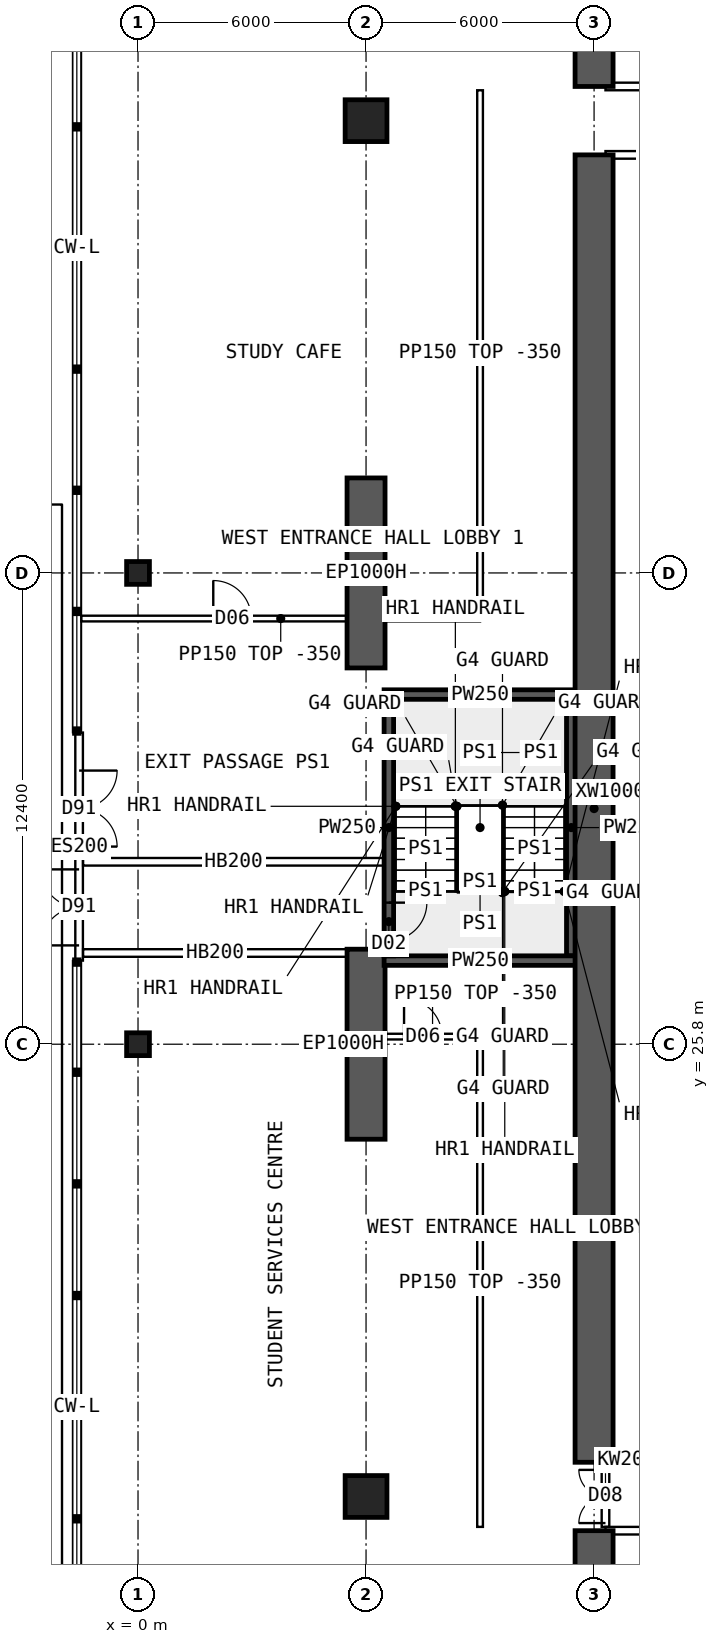
"""IFC4 building model, lengths in metres.
Left out: names, types, materials, properties, quantities, classifications, styles, units other than length and angle.
Written with IfcOpenShell. Run it as: python <this file> out.ifc"""

import sys

from ifc_helpers import new_model, si_unit, direction, frame, frame_2d, origin, origin_2d, place, context, subcontext, project, spatial, polyline, rectangle, hollow_rectangle, outline, extrude, element, fill, save


model = new_model("IFC4")
c1 = context("Model", 3, precision=1e-05, world=origin(), true_north=direction((0.0, 1.0)))
c2 = subcontext(c1, "Body", "Model", "MODEL_VIEW")
j1 = project(units=[si_unit("LENGTHUNIT", "METRE"), si_unit("PLANEANGLEUNIT", "RADIAN")], contexts=[c1])
p1 = place(None, origin())
s1 = spatial("IfcSite", under=j1, at=p1, CompositionType="ELEMENT")
p2 = place(p1, origin())
s2 = spatial("IfcBuilding", under=s1, at=p2, CompositionType="ELEMENT")
p3 = place(p2, origin())
s3 = spatial("IfcBuildingStorey", under=s2, at=p3, CompositionType="ELEMENT", Elevation=0.0)
for number, where, z_axis, x_axis in (
    (1, (6.0, 23.3, 0.0), (0.0, 0.0, 1.0), (0.0, 1.0, 0.0)),
    (2, (6.0, 35.7, 0.0), (0.0, 0.0, 1.0), (0.0, 1.0, 0.0)),
):
    element("IfcWall", number, at=place(p3, frame(where, z_axis=z_axis, x_axis=x_axis)), inside=s3, PredefinedType="SHEAR", context=c2, shape_type="SweptSolid", body=[
        extrude(rectangle(XDim=5.0, YDim=1.0, at=frame_2d((2.5, 0.0))), origin(), (0.0, 0.0, 1.0), 6.0),
    ])
for number, where, z_axis, x_axis in (
    (3, (6.0, 13.9, 0.0), (0.0, 0.0, 1.0), (1.0, 0.0, 0.0)),
    (4, (6.0, 50.1, 0.0), (0.0, 0.0, 1.0), (1.0, 0.0, 0.0)),
):
    element("IfcColumn", number, at=place(p3, frame(where, z_axis=z_axis, x_axis=x_axis)), inside=s3, PredefinedType="COLUMN", context=c2, shape_type="SweptSolid", body=[
        extrude(hollow_rectangle(XDim=1.1, YDim=1.1, WallThickness=0.11, at=origin_2d()), origin(), (0.0, 0.0, 1.0), 6.0),
    ])
for number, where, z_axis, x_axis in (
    (5, (0.0, 25.8, 0.0), (0.0, 0.0, 1.0), (1.0, 0.0, 0.0)),
    (6, (0.0, 38.2, 0.0), (0.0, 0.0, 1.0), (1.0, 0.0, 0.0)),
):
    element("IfcColumn", number, at=place(p3, frame(where, z_axis=z_axis, x_axis=x_axis)), inside=s3, PredefinedType="COLUMN", context=c2, shape_type="SweptSolid", body=[
        extrude(hollow_rectangle(XDim=0.6, YDim=0.6, WallThickness=0.06, at=origin_2d()), origin(), (0.0, 0.0, 1.0), 6.0),
    ])
p4 = place(p3, frame((6.475, 28.0, 0.0), z_axis=(0.0, 0.0, 1.0), x_axis=(1.0, 0.0, 0.0)))
e7 = element("IfcWall", 7, at=p4, inside=s3, PredefinedType="SHEAR", context=c2, shape_type="SweptSolid", body=[
    extrude(rectangle(XDim=5.05, YDim=0.25, at=frame_2d((2.525, 0.0))), origin(), (0.0, 0.0, 1.0), 6.0),
])
p5 = place(p3, frame((11.4, 28.125, 0.0), z_axis=(0.0, 0.0, 1.0), x_axis=(0.0, 1.0, 0.0)))
e8 = element("IfcWall", 8, at=p5, inside=s3, PredefinedType="SHEAR", context=c2, shape_type="SweptSolid", body=[
    extrude(rectangle(XDim=6.75, YDim=0.25, at=frame_2d((3.375, 0.0))), origin(), (0.0, 0.0, 1.0), 6.0),
])
p6 = place(p3, frame((11.525, 35.0, 0.0), z_axis=(0.0, 0.0, 1.0), x_axis=(-1.0, 0.0, 0.0)))
e9 = element("IfcWall", 9, at=p6, inside=s3, PredefinedType="SHEAR", context=c2, shape_type="SweptSolid", body=[
    extrude(rectangle(XDim=5.05, YDim=0.25, at=frame_2d((2.525, 0.0))), origin(), (0.0, 0.0, 1.0), 6.0),
])
p7 = place(p3, frame((6.6, 34.875, 0.0), z_axis=(0.0, 0.0, 1.0), x_axis=(0.0, -1.0, 0.0)))
e10 = element("IfcWall", 10, at=p7, inside=s3, PredefinedType="SHEAR", context=c2, shape_type="SweptSolid", body=[
    extrude(rectangle(XDim=6.75, YDim=0.25, at=frame_2d((3.375, 0.0))), origin(), (0.0, 0.0, 1.0), 6.0),
])
p8 = place(p7, frame((5.35, 0.0, 0.0)))
e11 = element("IfcOpeningElement", 11, at=p8, cuts=e10, PredefinedType="OPENING", context=c2, shape_type="SweptSolid", body=[
    extrude(rectangle(XDim=1.0, YDim=2.1, at=frame_2d((0.5, 1.05))), frame((0.0, 0.135, 0.0), z_axis=(0.0, -1.0, 0.0), x_axis=(1.0, 0.0, 0.0)), (0.0, 0.0, 1.0), 0.27),
])
for number, where, z_axis, x_axis in (
    (12, (12.0, 7.7, 0.0), (0.0, 0.0, 1.0), (0.0, 1.0, 0.0)),
    (13, (12.0, 51.0, 0.0), (0.0, 0.0, 1.0), (0.0, 1.0, 0.0)),
):
    element("IfcWall", number, at=place(p3, frame(where, z_axis=z_axis, x_axis=x_axis)), inside=s3, PredefinedType="SHEAR", context=c2, shape_type="SweptSolid", body=[
        extrude(rectangle(XDim=5.3, YDim=1.0, at=frame_2d((2.65, 0.0))), origin(), (0.0, 0.0, 1.0), 6.0),
    ])
p9 = place(p3, frame((12.0, 14.8, 0.0), z_axis=(0.0, 0.0, 1.0), x_axis=(0.0, 1.0, 0.0)))
e14 = element("IfcWall", 14, at=p9, inside=s3, PredefinedType="SHEAR", context=c2, shape_type="SweptSolid", body=[
    extrude(rectangle(XDim=34.4, YDim=1.0, at=frame_2d((17.2, 0.0))), origin(), (0.0, 0.0, 1.0), 6.0),
])
p10 = place(p3, frame((-1.55, 34.0, 0.0), z_axis=(0.0, 0.0, 1.0), x_axis=(0.0, -1.0, 0.0)))
e15 = element("IfcWall", 15, at=p10, inside=s3, PredefinedType="SOLIDWALL", context=c2, shape_type="SweptSolid", body=[
    extrude(rectangle(XDim=6.0, YDim=0.2, at=frame_2d((3.0, 0.0))), origin(), (0.0, 0.0, 1.0), 5.65),
])
p11 = place(p10, frame((1.0, 0.0, 0.0)))
e16 = element("IfcOpeningElement", 16, at=p11, cuts=e15, PredefinedType="OPENING", context=c2, shape_type="SweptSolid", body=[
    extrude(rectangle(XDim=2.0, YDim=2.4, at=frame_2d((1.0, 1.2))), frame((0.0, 0.11, 0.0), z_axis=(0.0, -1.0, 0.0), x_axis=(1.0, 0.0, 0.0)), (0.0, 0.0, 1.0), 0.22),
])
p12 = place(p10, frame((3.6, 0.0, 0.0)))
e17 = element("IfcOpeningElement", 17, at=p12, cuts=e15, PredefinedType="OPENING", context=c2, shape_type="SweptSolid", body=[
    extrude(rectangle(XDim=2.0, YDim=2.4, at=frame_2d((1.0, 1.2))), frame((0.0, 0.11, 0.0), z_axis=(0.0, -1.0, 0.0), x_axis=(1.0, 0.0, 0.0)), (0.0, 0.0, 1.0), 0.22),
])
for number, where, z_axis, x_axis in (
    (18, (12.3, 13.0, 0.0), (0.0, 0.0, 1.0), (1.0, 0.0, 0.0)),
    (19, (12.3, 51.0, 0.0), (0.0, 0.0, 1.0), (1.0, 0.0, 0.0)),
):
    element("IfcWall", number, at=place(p3, frame(where, z_axis=z_axis, x_axis=x_axis)), inside=s3, PredefinedType="SOLIDWALL", context=c2, shape_type="SweptSolid", body=[
        extrude(rectangle(XDim=5.2, YDim=0.2, at=frame_2d((2.6, 0.0))), origin(), (0.0, 0.0, 1.0), 5.65),
    ])
for number, where, z_axis, x_axis in (
    (20, (12.3, 14.8, 0.0), (0.0, 0.0, 1.0), (1.0, 0.0, 0.0)),
    (21, (12.3, 49.2, 0.0), (0.0, 0.0, 1.0), (1.0, 0.0, 0.0)),
):
    element("IfcWall", number, at=place(p3, frame(where, z_axis=z_axis, x_axis=x_axis)), inside=s3, PredefinedType="SOLIDWALL", context=c2, shape_type="SweptSolid", body=[
        extrude(rectangle(XDim=3.3, YDim=0.2, at=frame_2d((1.65, 0.0))), origin(), (0.0, 0.0, 1.0), 5.65),
    ])
p13 = place(p3, frame((-1.445, 28.2, 0.0), z_axis=(0.0, 0.0, 1.0), x_axis=(1.0, 0.0, 0.0)))
e22 = element("IfcWall", 22, at=p13, inside=s3, PredefinedType="SOLIDWALL", context=c2, shape_type="SweptSolid", body=[
    extrude(outline(polyline([(0.0, 0.0), (6.945, 0.0), (6.945, 5.65), (1.747, 5.65), (1.745, 5.05), (1.147, 5.05), (1.145, 5.65), (0.0, 5.65), (0.0, 0.0)])), frame((0.0, 0.1, 0.0), z_axis=(0.0, -1.0, 0.0), x_axis=(1.0, 0.0, 0.0)), (0.0, 0.0, 1.0), 0.2),
])
p14 = place(p3, frame((-1.445, 30.6, 0.0), z_axis=(0.0, 0.0, 1.0), x_axis=(1.0, 0.0, 0.0)))
e23 = element("IfcWall", 23, at=p14, inside=s3, PredefinedType="SOLIDWALL", context=c2, shape_type="SweptSolid", body=[
    extrude(outline(polyline([(0.0, 0.0), (7.92, 0.0), (7.92, 5.65), (7.747, 5.65), (7.745, 5.05), (7.147, 5.05), (7.145, 5.65), (1.747, 5.65), (1.745, 5.05), (1.147, 5.05), (1.145, 5.65), (0.0, 5.65), (0.0, 0.0)])), frame((0.0, 0.1, 0.0), z_axis=(0.0, -1.0, 0.0), x_axis=(1.0, 0.0, 0.0)), (0.0, 0.0, 1.0), 0.2),
])
p15 = place(p3, frame((6.5, 26.0, 0.0), z_axis=(0.0, 0.0, 1.0), x_axis=(1.0, 0.0, 0.0)))
e24 = element("IfcWall", 24, at=p15, inside=s3, PredefinedType="PARTITIONING", context=c2, shape_type="SweptSolid", body=[
    extrude(rectangle(XDim=2.5, YDim=0.15, at=frame_2d((1.25, 0.0))), origin(), (0.0, 0.0, 1.0), 5.65),
])
p16 = place(p15, frame((0.5, 0.0, 0.0)))
e25 = element("IfcOpeningElement", 25, at=p16, cuts=e24, PredefinedType="OPENING", context=c2, shape_type="SweptSolid", body=[
    extrude(rectangle(XDim=1.0, YDim=2.1, at=frame_2d((0.5, 1.05))), frame((0.0, 0.085, 0.0), z_axis=(0.0, -1.0, 0.0), x_axis=(1.0, 0.0, 0.0)), (0.0, 0.0, 1.0), 0.17),
])
p17 = place(p3, frame((-1.49, 37.0, 0.0), z_axis=(0.0, 0.0, 1.0), x_axis=(1.0, 0.0, 0.0)))
e26 = element("IfcWall", 26, at=p17, inside=s3, PredefinedType="PARTITIONING", context=c2, shape_type="SweptSolid", body=[
    extrude(outline(polyline([(0.0, 0.0), (10.49, 0.0), (10.49, 5.65), (1.792, 5.65), (1.79, 5.05), (1.192, 5.05), (1.19, 5.65), (0.0, 5.65), (0.0, 0.0)])), frame((0.0, 0.075, 0.0), z_axis=(0.0, -1.0, 0.0), x_axis=(1.0, 0.0, 0.0)), (0.0, 0.0, 1.0), 0.15),
])
p18 = place(p17, frame((3.47, 0.0, 0.0)))
e27 = element("IfcOpeningElement", 27, at=p18, cuts=e26, PredefinedType="OPENING", context=c2, shape_type="SweptSolid", body=[
    extrude(rectangle(XDim=1.0, YDim=2.1, at=frame_2d((0.5, 1.05))), frame((0.0, 0.085, 0.0), z_axis=(0.0, -1.0, 0.0), x_axis=(1.0, 0.0, 0.0)), (0.0, 0.0, 1.0), 0.17),
])
p19 = place(p3, frame((9.0, 13.1, 0.0), z_axis=(0.0, 0.0, 1.0), x_axis=(0.0, 1.0, 0.0)))
e28 = element("IfcWall", 28, at=p19, inside=s3, PredefinedType="PARTITIONING", context=c2, shape_type="SweptSolid", body=[
    extrude(rectangle(XDim=12.825, YDim=0.15, at=frame_2d((6.413, 0.0))), origin(), (0.0, 0.0, 1.0), 5.65),
])
p20 = place(p3, frame((9.0, 37.075, 0.0), z_axis=(0.0, 0.0, 1.0), x_axis=(0.0, 1.0, 0.0)))
e29 = element("IfcWall", 29, at=p20, inside=s3, PredefinedType="PARTITIONING", context=c2, shape_type="SweptSolid", body=[
    extrude(rectangle(XDim=13.825, YDim=0.15, at=frame_2d((6.913, 0.0))), origin(), (0.0, 0.0, 1.0), 5.65),
])
p21 = place(p3, frame((12.3, 13.1, 0.0), z_axis=(0.0, 0.0, 1.0), x_axis=(0.0, 1.0, 0.0)))
e30 = element("IfcWall", 30, at=p21, inside=s3, PredefinedType="SOLIDWALL", context=c2, shape_type="SweptSolid", body=[
    extrude(rectangle(XDim=1.6, YDim=0.2, at=frame_2d((0.8, 0.0))), origin(), (0.0, 0.0, 1.0), 5.65),
])
p22 = place(p21, frame((0.1, 0.0, 0.0)))
e31 = element("IfcOpeningElement", 31, at=p22, cuts=e30, PredefinedType="OPENING", context=c2, shape_type="SweptSolid", body=[
    extrude(rectangle(XDim=1.4, YDim=2.1, at=frame_2d((0.7, 1.05))), frame((0.0, 0.11, 0.0), z_axis=(0.0, -1.0, 0.0), x_axis=(1.0, 0.0, 0.0)), (0.0, 0.0, 1.0), 0.22),
])
p23 = place(p11, origin())
e32 = element("IfcDoor", 32, at=p23, inside=s3, OperationType="DOUBLE_DOOR_SINGLE_SWING", PredefinedType="DOOR", context=c2, shape_type="SweptSolid", body=[
    extrude(rectangle(XDim=2.0, YDim=2.4, at=frame_2d((1.0, 1.2))), frame((0.0, 0.025, 0.0), z_axis=(0.0, -1.0, 0.0), x_axis=(1.0, 0.0, 0.0)), (0.0, 0.0, 1.0), 0.05),
])
fill(e16, e32)
p24 = place(p12, frame((2.0, 0.0, 0.0), z_axis=(0.0, 0.0, 1.0), x_axis=(-1.0, 0.0, 0.0)))
e33 = element("IfcDoor", 33, at=p24, inside=s3, OperationType="DOUBLE_DOOR_SINGLE_SWING", PredefinedType="DOOR", context=c2, shape_type="SweptSolid", body=[
    extrude(rectangle(XDim=2.0, YDim=2.4, at=frame_2d((1.0, 1.2))), frame((0.0, 0.025, 0.0), z_axis=(0.0, -1.0, 0.0), x_axis=(1.0, 0.0, 0.0)), (0.0, 0.0, 1.0), 0.05),
])
fill(e17, e33)
p25 = place(p8, origin())
e34 = element("IfcDoor", 34, at=p25, inside=s3, OperationType="SINGLE_SWING_LEFT", PredefinedType="DOOR", context=c2, shape_type="SweptSolid", body=[
    extrude(rectangle(XDim=1.0, YDim=2.1, at=frame_2d((0.5, 1.05))), frame((0.0, 0.025, 0.0), z_axis=(0.0, -1.0, 0.0), x_axis=(1.0, 0.0, 0.0)), (0.0, 0.0, 1.0), 0.05),
])
fill(e11, e34)
p26 = place(p16, origin())
e35 = element("IfcDoor", 35, at=p26, inside=s3, OperationType="SINGLE_SWING_LEFT", PredefinedType="DOOR", context=c2, shape_type="SweptSolid", body=[
    extrude(rectangle(XDim=1.0, YDim=2.1, at=frame_2d((0.5, 1.05))), frame((0.0, 0.025, 0.0), z_axis=(0.0, -1.0, 0.0), x_axis=(1.0, 0.0, 0.0)), (0.0, 0.0, 1.0), 0.05),
])
fill(e25, e35)
p27 = place(p18, origin())
e36 = element("IfcDoor", 36, at=p27, inside=s3, OperationType="SINGLE_SWING_LEFT", PredefinedType="DOOR", context=c2, shape_type="SweptSolid", body=[
    extrude(rectangle(XDim=1.0, YDim=2.1, at=frame_2d((0.5, 1.05))), frame((0.0, 0.025, 0.0), z_axis=(0.0, -1.0, 0.0), x_axis=(1.0, 0.0, 0.0)), (0.0, 0.0, 1.0), 0.05),
])
fill(e27, e36)
p28 = place(p22, origin())
e37 = element("IfcDoor", 37, at=p28, inside=s3, OperationType="DOUBLE_DOOR_SINGLE_SWING", PredefinedType="DOOR", context=c2, shape_type="SweptSolid", body=[
    extrude(rectangle(XDim=1.4, YDim=2.1, at=frame_2d((0.7, 1.05))), frame((0.0, 0.025, 0.0), z_axis=(0.0, -1.0, 0.0), x_axis=(1.0, 0.0, 0.0)), (0.0, 0.0, 1.0), 0.05),
])
fill(e31, e37)
save(model, sys.argv[1])
